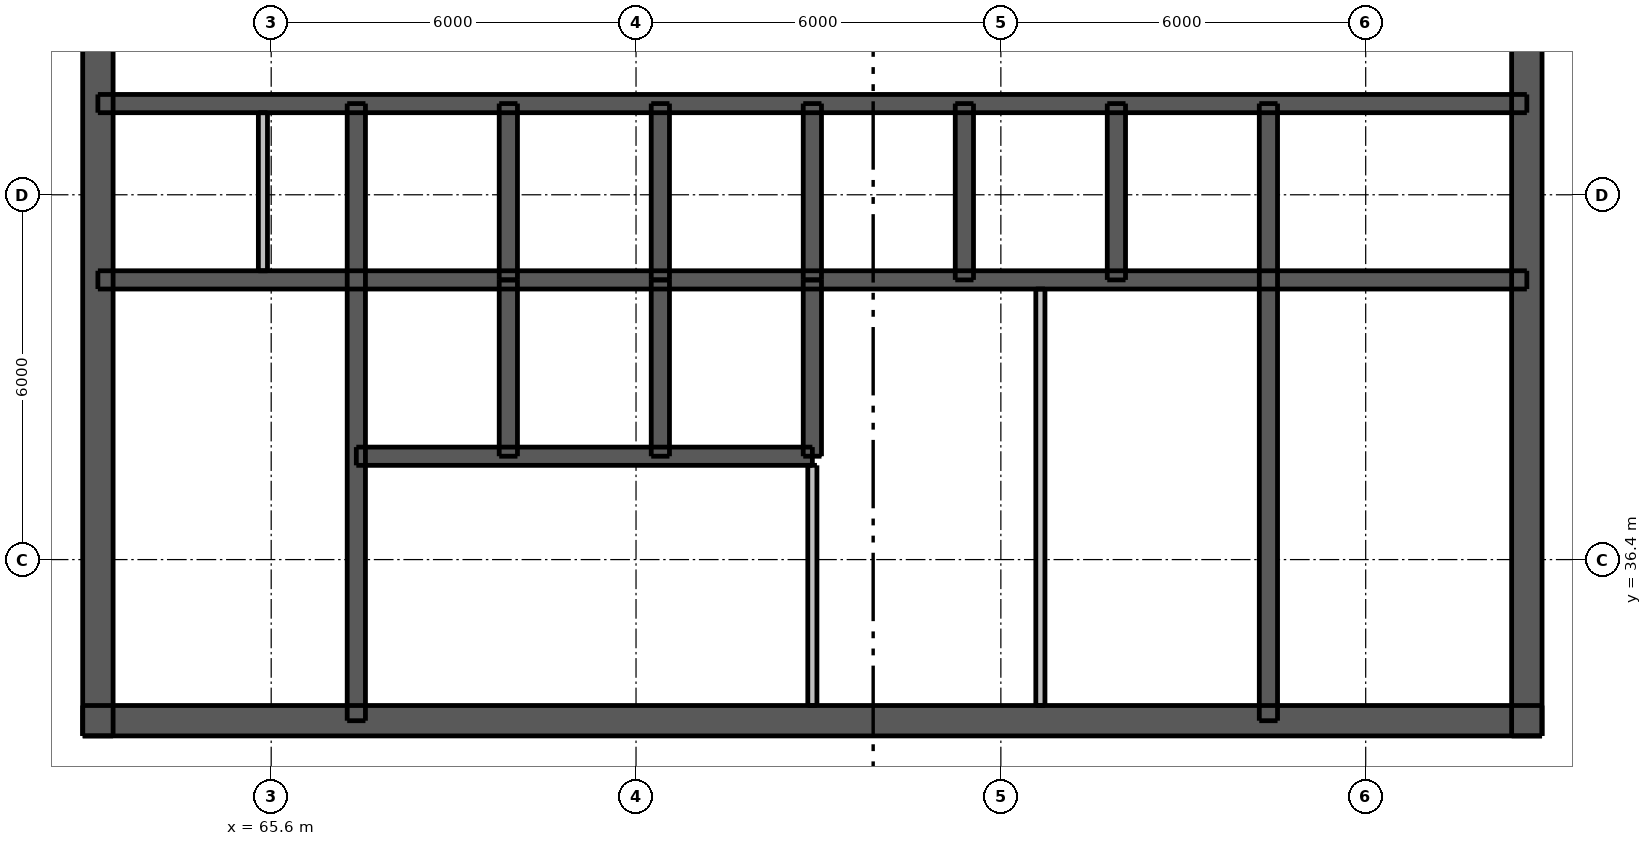
"""IFC4 building model, lengths in metres.
Left out: names, types, materials, properties, quantities, classifications, styles, units other than length and angle.
Written with IfcOpenShell. Run it as: python <this file> out.ifc"""

import sys

from ifc_helpers import new_model, si_unit, direction, frame, frame_2d, origin, place, context, subcontext, project, spatial, rectangle, extrude, element, fill, save


model = new_model("IFC4")
c1 = context("Model", 3, precision=1e-05, world=origin(), true_north=direction((0.0, 1.0)))
c2 = subcontext(c1, "Body", "Model", "MODEL_VIEW")
j1 = project(units=[si_unit("LENGTHUNIT", "METRE"), si_unit("PLANEANGLEUNIT", "RADIAN")], contexts=[c1])
p1 = place(None, origin())
s1 = spatial("IfcSite", under=j1, at=p1, CompositionType="ELEMENT")
p2 = place(p1, origin())
s2 = spatial("IfcBuilding", under=s1, at=p2, CompositionType="ELEMENT")
p3 = place(p2, frame((0.0, 0.0, 262.0)))
s3 = spatial("IfcBuildingStorey", under=s2, at=p3, CompositionType="ELEMENT", Elevation=262.0)
p4 = place(p3, frame((62.5, 33.75, 0.0), z_axis=(0.0, 0.0, 1.0), x_axis=(1.0, 0.0, 0.0)))
e1 = element("IfcWall", 1, at=p4, inside=s3, PredefinedType="SHEAR", context=c2, shape_type="SweptSolid", body=[
    extrude(rectangle(XDim=24.0, YDim=0.5, at=frame_2d((12.0, 0.0))), origin(), (0.0, 0.0, 1.0), 3.05),
])
p5 = place(p4, frame((1.875, 0.0, 0.0)))
e2 = element("IfcOpeningElement", 2, at=p5, cuts=e1, PredefinedType="OPENING", context=c2, shape_type="SweptSolid", body=[
    extrude(rectangle(XDim=1.1, YDim=2.1, at=frame_2d((0.55, 1.05))), frame((0.0, 0.26, 0.0), z_axis=(0.0, -1.0, 0.0), x_axis=(1.0, 0.0, 0.0)), (0.0, 0.0, 1.0), 0.52),
])
p6 = place(p4, frame((21.025, 0.0, 0.0)))
e3 = element("IfcOpeningElement", 3, at=p6, cuts=e1, PredefinedType="OPENING", context=c2, shape_type="SweptSolid", body=[
    extrude(rectangle(XDim=1.1, YDim=2.1, at=frame_2d((0.55, 1.05))), frame((0.0, 0.26, 0.0), z_axis=(0.0, -1.0, 0.0), x_axis=(1.0, 0.0, 0.0)), (0.0, 0.0, 1.0), 0.52),
])
p7 = place(p4, frame((8.0, 0.0, 0.0)))
e4 = element("IfcOpeningElement", 4, at=p7, cuts=e1, PredefinedType="OPENING", context=c2, shape_type="SweptSolid", body=[
    extrude(rectangle(XDim=1.1, YDim=2.1, at=frame_2d((0.55, 1.05))), frame((0.0, 0.26, 0.0), z_axis=(0.0, -1.0, 0.0), x_axis=(1.0, 0.0, 0.0)), (0.0, 0.0, 1.0), 0.52),
])
p8 = place(p4, frame((13.5, 0.0, 0.0)))
e5 = element("IfcOpeningElement", 5, at=p8, cuts=e1, PredefinedType="OPENING", context=c2, shape_type="SweptSolid", body=[
    extrude(rectangle(XDim=0.9, YDim=2.1, at=frame_2d((0.45, 1.05))), frame((0.0, 0.26, 0.0), z_axis=(0.0, -1.0, 0.0), x_axis=(1.0, 0.0, 0.0)), (0.0, 0.0, 1.0), 0.52),
])
p9 = place(p4, frame((17.1, 0.0, 0.0)))
e6 = element("IfcOpeningElement", 6, at=p9, cuts=e1, PredefinedType="OPENING", context=c2, shape_type="SweptSolid", body=[
    extrude(rectangle(XDim=0.9, YDim=2.1, at=frame_2d((0.45, 1.05))), frame((0.0, 0.26, 0.0), z_axis=(0.0, -1.0, 0.0), x_axis=(1.0, 0.0, 0.0)), (0.0, 0.0, 1.0), 0.52),
])
p10 = place(p3, frame((62.75, 33.5, 0.0), z_axis=(0.0, 0.0, 1.0), x_axis=(0.0, 1.0, 0.0)))
e7 = element("IfcWall", 7, at=p10, inside=s3, PredefinedType="SHEAR", context=c2, shape_type="SweptSolid", body=[
    extrude(rectangle(XDim=24.0, YDim=0.5, at=frame_2d((12.0, 0.0))), origin(), (0.0, 0.0, 1.0), 3.05),
])
p11 = place(p10, frame((11.2, 0.0, 0.0)))
e8 = element("IfcOpeningElement", 8, at=p11, cuts=e7, PredefinedType="OPENING", context=c2, shape_type="SweptSolid", body=[
    extrude(rectangle(XDim=1.6, YDim=2.1, at=frame_2d((0.8, 1.05))), frame((0.0, 0.26, 0.0), z_axis=(0.0, -1.0, 0.0), x_axis=(1.0, 0.0, 0.0)), (0.0, 0.0, 1.0), 0.52),
])
p12 = place(p3, frame((86.25, 33.5, 0.0), z_axis=(0.0, 0.0, 1.0), x_axis=(0.0, 1.0, 0.0)))
e9 = element("IfcWall", 9, at=p12, inside=s3, PredefinedType="SHEAR", context=c2, shape_type="SweptSolid", body=[
    extrude(rectangle(XDim=24.0, YDim=0.5, at=frame_2d((12.0, 0.0))), origin(), (0.0, 0.0, 1.0), 3.05),
])
p13 = place(p12, frame((11.2, 0.0, 0.0)))
e10 = element("IfcOpeningElement", 10, at=p13, cuts=e9, PredefinedType="OPENING", context=c2, shape_type="SweptSolid", body=[
    extrude(rectangle(XDim=1.6, YDim=2.1, at=frame_2d((0.8, 1.05))), frame((0.0, 0.26, 0.0), z_axis=(0.0, -1.0, 0.0), x_axis=(1.0, 0.0, 0.0)), (0.0, 0.0, 1.0), 0.52),
])
p14 = place(p3, frame((62.75, 41.0, 0.0), z_axis=(0.0, 0.0, 1.0), x_axis=(1.0, 0.0, 0.0)))
e11 = element("IfcWall", 11, at=p14, inside=s3, PredefinedType="SHEAR", context=c2, shape_type="SweptSolid", body=[
    extrude(rectangle(XDim=23.5, YDim=0.3, at=frame_2d((11.75, 0.0))), origin(), (0.0, 0.0, 1.0), 3.05),
])
p15 = place(p3, frame((62.75, 43.9, 0.0), z_axis=(0.0, 0.0, 1.0), x_axis=(1.0, 0.0, 0.0)))
e12 = element("IfcWall", 12, at=p15, inside=s3, PredefinedType="SHEAR", context=c2, shape_type="SweptSolid", body=[
    extrude(rectangle(XDim=23.5, YDim=0.3, at=frame_2d((11.75, 0.0))), origin(), (0.0, 0.0, 1.0), 3.05),
])
p16 = place(p15, frame((1.032, 0.0, 0.0)))
e13 = element("IfcOpeningElement", 13, at=p16, cuts=e12, PredefinedType="OPENING", context=c2, shape_type="SweptSolid", body=[
    extrude(rectangle(XDim=0.9, YDim=2.1, at=frame_2d((0.45, 1.05))), frame((0.0, 0.16, 0.0), z_axis=(0.0, -1.0, 0.0), x_axis=(1.0, 0.0, 0.0)), (0.0, 0.0, 1.0), 0.32),
])
p17 = place(p15, frame((3.007, 0.0, 0.0)))
e14 = element("IfcOpeningElement", 14, at=p17, cuts=e12, PredefinedType="OPENING", context=c2, shape_type="SweptSolid", body=[
    extrude(rectangle(XDim=0.8, YDim=2.1, at=frame_2d((0.4, 1.05))), frame((0.0, 0.16, 0.0), z_axis=(0.0, -1.0, 0.0), x_axis=(1.0, 0.0, 0.0)), (0.0, 0.0, 1.0), 0.32),
])
p18 = place(p15, frame((20.875, 0.0, 0.0)))
e15 = element("IfcOpeningElement", 15, at=p18, cuts=e12, PredefinedType="OPENING", context=c2, shape_type="SweptSolid", body=[
    extrude(rectangle(XDim=0.9, YDim=2.1, at=frame_2d((0.45, 1.05))), frame((0.0, 0.16, 0.0), z_axis=(0.0, -1.0, 0.0), x_axis=(1.0, 0.0, 0.0)), (0.0, 0.0, 1.0), 0.32),
])
p19 = place(p15, frame((5.05, 0.0, 0.0)))
e16 = element("IfcOpeningElement", 16, at=p19, cuts=e12, PredefinedType="OPENING", context=c2, shape_type="SweptSolid", body=[
    extrude(rectangle(XDim=0.9, YDim=2.1, at=frame_2d((0.45, 1.05))), frame((0.0, 0.16, 0.0), z_axis=(0.0, -1.0, 0.0), x_axis=(1.0, 0.0, 0.0)), (0.0, 0.0, 1.0), 0.32),
])
p20 = place(p15, frame((10.05, 0.0, 0.0)))
e17 = element("IfcOpeningElement", 17, at=p20, cuts=e12, PredefinedType="OPENING", context=c2, shape_type="SweptSolid", body=[
    extrude(rectangle(XDim=0.9, YDim=2.1, at=frame_2d((0.45, 1.05))), frame((0.0, 0.16, 0.0), z_axis=(0.0, -1.0, 0.0), x_axis=(1.0, 0.0, 0.0)), (0.0, 0.0, 1.0), 0.32),
])
p21 = place(p15, frame((12.55, 0.0, 0.0)))
e18 = element("IfcOpeningElement", 18, at=p21, cuts=e12, PredefinedType="OPENING", context=c2, shape_type="SweptSolid", body=[
    extrude(rectangle(XDim=0.9, YDim=2.1, at=frame_2d((0.45, 1.05))), frame((0.0, 0.16, 0.0), z_axis=(0.0, -1.0, 0.0), x_axis=(1.0, 0.0, 0.0)), (0.0, 0.0, 1.0), 0.32),
])
p22 = place(p15, frame((17.55, 0.0, 0.0)))
e19 = element("IfcOpeningElement", 19, at=p22, cuts=e12, PredefinedType="OPENING", context=c2, shape_type="SweptSolid", body=[
    extrude(rectangle(XDim=0.9, YDim=2.1, at=frame_2d((0.45, 1.05))), frame((0.0, 0.16, 0.0), z_axis=(0.0, -1.0, 0.0), x_axis=(1.0, 0.0, 0.0)), (0.0, 0.0, 1.0), 0.32),
])
p23 = place(p3, frame((67.0, 33.75, 0.0), z_axis=(0.0, 0.0, 1.0), x_axis=(0.0, 1.0, 0.0)))
e20 = element("IfcWall", 20, at=p23, inside=s3, PredefinedType="SHEAR", context=c2, shape_type="SweptSolid", body=[
    extrude(rectangle(XDim=10.15, YDim=0.3, at=frame_2d((5.075, 0.0))), origin(), (0.0, 0.0, 1.0), 3.05),
])
p24 = place(p23, frame((0.45, 0.0, 0.0)))
e21 = element("IfcOpeningElement", 21, at=p24, cuts=e20, PredefinedType="OPENING", context=c2, shape_type="SweptSolid", body=[
    extrude(rectangle(XDim=1.1, YDim=2.1, at=frame_2d((0.55, 1.05))), frame((0.0, 0.16, 0.0), z_axis=(0.0, -1.0, 0.0), x_axis=(1.0, 0.0, 0.0)), (0.0, 0.0, 1.0), 0.32),
])
p25 = place(p3, frame((82.0, 33.75, 0.0), z_axis=(0.0, 0.0, 1.0), x_axis=(0.0, 1.0, 0.0)))
e22 = element("IfcWall", 22, at=p25, inside=s3, PredefinedType="SHEAR", context=c2, shape_type="SweptSolid", body=[
    extrude(rectangle(XDim=10.15, YDim=0.3, at=frame_2d((5.075, 0.0))), origin(), (0.0, 0.0, 1.0), 3.05),
])
for number, where, z_axis, x_axis in (
    (23, (69.5, 41.0, 0.0), (0.0, 0.0, 1.0), (0.0, 1.0, 0.0)),
    (24, (72.0, 41.0, 0.0), (0.0, 0.0, 1.0), (0.0, 1.0, 0.0)),
    (25, (74.5, 41.0, 0.0), (0.0, 0.0, 1.0), (0.0, 1.0, 0.0)),
    (26, (77.0, 41.0, 0.0), (0.0, 0.0, 1.0), (0.0, 1.0, 0.0)),
    (27, (79.5, 41.0, 0.0), (0.0, 0.0, 1.0), (0.0, 1.0, 0.0)),
):
    element("IfcWall", number, at=place(p3, frame(where, z_axis=z_axis, x_axis=x_axis)), inside=s3, PredefinedType="SHEAR", context=c2, shape_type="SweptSolid", body=[
        extrude(rectangle(XDim=2.9, YDim=0.3, at=frame_2d((1.45, 0.0))), origin(), (0.0, 0.0, 1.0), 3.05),
    ])
p26 = place(p3, frame((67.0, 38.1, 0.0), z_axis=(0.0, 0.0, 1.0), x_axis=(1.0, 0.0, 0.0)))
e28 = element("IfcWall", 28, at=p26, inside=s3, PredefinedType="SHEAR", context=c2, shape_type="SweptSolid", body=[
    extrude(rectangle(XDim=7.5, YDim=0.3, at=frame_2d((3.75, 0.0))), origin(), (0.0, 0.0, 1.0), 3.05),
])
p27 = place(p26, frame((0.7, 0.0, 0.0)))
e29 = element("IfcOpeningElement", 29, at=p27, cuts=e28, PredefinedType="OPENING", context=c2, shape_type="SweptSolid", body=[
    extrude(rectangle(XDim=1.1, YDim=2.1, at=frame_2d((0.55, 1.05))), frame((0.0, 0.16, 0.0), z_axis=(0.0, -1.0, 0.0), x_axis=(1.0, 0.0, 0.0)), (0.0, 0.0, 1.0), 0.32),
])
p28 = place(p26, frame((3.2, 0.0, 0.0)))
e30 = element("IfcOpeningElement", 30, at=p28, cuts=e28, PredefinedType="OPENING", context=c2, shape_type="SweptSolid", body=[
    extrude(rectangle(XDim=1.1, YDim=2.1, at=frame_2d((0.55, 1.05))), frame((0.0, 0.16, 0.0), z_axis=(0.0, -1.0, 0.0), x_axis=(1.0, 0.0, 0.0)), (0.0, 0.0, 1.0), 0.32),
])
p29 = place(p26, frame((5.65, 0.0, 0.0)))
e31 = element("IfcOpeningElement", 31, at=p29, cuts=e28, PredefinedType="OPENING", context=c2, shape_type="SweptSolid", body=[
    extrude(rectangle(XDim=1.2, YDim=2.1, at=frame_2d((0.6, 1.05))), frame((0.0, 0.16, 0.0), z_axis=(0.0, -1.0, 0.0), x_axis=(1.0, 0.0, 0.0)), (0.0, 0.0, 1.0), 0.32),
])
for number, where, z_axis, x_axis in (
    (32, (69.5, 38.1, 0.0), (0.0, 0.0, 1.0), (0.0, 1.0, 0.0)),
    (33, (72.0, 38.1, 0.0), (0.0, 0.0, 1.0), (0.0, 1.0, 0.0)),
    (34, (74.5, 38.1, 0.0), (0.0, 0.0, 1.0), (0.0, 1.0, 0.0)),
):
    element("IfcWall", number, at=place(p3, frame(where, z_axis=z_axis, x_axis=x_axis)), inside=s3, PredefinedType="SHEAR", context=c2, shape_type="SweptSolid", body=[
        extrude(rectangle(XDim=2.9, YDim=0.3, at=frame_2d((1.45, 0.0))), origin(), (0.0, 0.0, 1.0), 3.05),
    ])
p30 = place(p3, frame((74.5, 34.0, 0.0), z_axis=(0.0, 0.0, 1.0), x_axis=(0.0, 1.0, 0.0)))
e35 = element("IfcWall", 35, at=p30, inside=s3, PredefinedType="PLUMBINGWALL", context=c2, shape_type="SweptSolid", body=[
    extrude(rectangle(XDim=3.95, YDim=0.15, at=frame_2d((1.975, 0.0))), origin(), (0.0, 0.0, 1.0), 3.05),
])
p31 = place(p3, frame((78.25, 34.0, 0.0), z_axis=(0.0, 0.0, 1.0), x_axis=(0.0, 1.0, 0.0)))
e36 = element("IfcWall", 36, at=p31, inside=s3, PredefinedType="PLUMBINGWALL", context=c2, shape_type="SweptSolid", body=[
    extrude(rectangle(XDim=6.85, YDim=0.15, at=frame_2d((3.425, 0.0))), origin(), (0.0, 0.0, 1.0), 3.05),
])
p32 = place(p3, frame((65.464, 41.15, 0.0), z_axis=(0.0, 0.0, 1.0), x_axis=(0.0, 1.0, 0.0)))
e37 = element("IfcWall", 37, at=p32, inside=s3, PredefinedType="PLUMBINGWALL", context=c2, shape_type="SweptSolid", body=[
    extrude(rectangle(XDim=2.6, YDim=0.15, at=frame_2d((1.3, 0.0))), origin(), (0.0, 0.0, 1.0), 3.05),
])
p33 = place(p5, origin())
e38 = element("IfcDoor", 38, at=p33, inside=s3, OperationType="SINGLE_SWING_LEFT", PredefinedType="DOOR", context=c2, shape_type="SweptSolid", body=[
    extrude(rectangle(XDim=1.1, YDim=2.1, at=frame_2d((0.55, 1.05))), frame((0.0, 0.237, 0.0), z_axis=(0.0, -1.0, 0.0), x_axis=(1.0, 0.0, 0.0)), (0.0, 0.0, 1.0), 0.05),
])
fill(e2, e38)
p34 = place(p6, origin())
e39 = element("IfcDoor", 39, at=p34, inside=s3, OperationType="SINGLE_SWING_RIGHT", PredefinedType="DOOR", context=c2, shape_type="SweptSolid", body=[
    extrude(rectangle(XDim=1.1, YDim=2.1, at=frame_2d((0.55, 1.05))), frame((0.0, 0.237, 0.0), z_axis=(0.0, -1.0, 0.0), x_axis=(1.0, 0.0, 0.0)), (0.0, 0.0, 1.0), 0.05),
])
fill(e3, e39)
p35 = place(p11, origin())
e40 = element("IfcDoor", 40, at=p35, inside=s3, OperationType="DOUBLE_DOOR_SINGLE_SWING", PredefinedType="DOOR", context=c2, shape_type="SweptSolid", body=[
    extrude(rectangle(XDim=1.6, YDim=2.1, at=frame_2d((0.8, 1.05))), frame((0.0, -0.188, 0.0), z_axis=(0.0, -1.0, 0.0), x_axis=(1.0, 0.0, 0.0)), (0.0, 0.0, 1.0), 0.05),
])
fill(e8, e40)
p36 = place(p13, origin())
e41 = element("IfcDoor", 41, at=p36, inside=s3, OperationType="DOUBLE_DOOR_SINGLE_SWING", PredefinedType="DOOR", context=c2, shape_type="SweptSolid", body=[
    extrude(rectangle(XDim=1.6, YDim=2.1, at=frame_2d((0.8, 1.05))), frame((0.0, 0.237, 0.0), z_axis=(0.0, -1.0, 0.0), x_axis=(1.0, 0.0, 0.0)), (0.0, 0.0, 1.0), 0.05),
])
fill(e10, e41)
p37 = place(p7, origin())
e42 = element("IfcDoor", 42, at=p37, inside=s3, OperationType="SINGLE_SWING_LEFT", PredefinedType="DOOR", context=c2, shape_type="SweptSolid", body=[
    extrude(rectangle(XDim=1.1, YDim=2.1, at=frame_2d((0.55, 1.05))), frame((0.0, 0.237, 0.0), z_axis=(0.0, -1.0, 0.0), x_axis=(1.0, 0.0, 0.0)), (0.0, 0.0, 1.0), 0.05),
])
fill(e4, e42)
p38 = place(p24, origin())
e43 = element("IfcDoor", 43, at=p38, inside=s3, OperationType="SINGLE_SWING_RIGHT", PredefinedType="DOOR", context=c2, shape_type="SweptSolid", body=[
    extrude(rectangle(XDim=1.1, YDim=2.1, at=frame_2d((0.55, 1.05))), frame((0.0, -0.087, 0.0), z_axis=(0.0, -1.0, 0.0), x_axis=(1.0, 0.0, 0.0)), (0.0, 0.0, 1.0), 0.05),
])
fill(e21, e43)
p39 = place(p8, origin())
e44 = element("IfcDoor", 44, at=p39, inside=s3, OperationType="SINGLE_SWING_LEFT", PredefinedType="DOOR", context=c2, shape_type="SweptSolid", body=[
    extrude(rectangle(XDim=0.9, YDim=2.1, at=frame_2d((0.45, 1.05))), frame((0.0, 0.237, 0.0), z_axis=(0.0, -1.0, 0.0), x_axis=(1.0, 0.0, 0.0)), (0.0, 0.0, 1.0), 0.05),
])
fill(e5, e44)
p40 = place(p9, origin())
e45 = element("IfcDoor", 45, at=p40, inside=s3, OperationType="SINGLE_SWING_LEFT", PredefinedType="DOOR", context=c2, shape_type="SweptSolid", body=[
    extrude(rectangle(XDim=0.9, YDim=2.1, at=frame_2d((0.45, 1.05))), frame((0.0, 0.237, 0.0), z_axis=(0.0, -1.0, 0.0), x_axis=(1.0, 0.0, 0.0)), (0.0, 0.0, 1.0), 0.05),
])
fill(e6, e45)
p41 = place(p16, origin())
e46 = element("IfcDoor", 46, at=p41, inside=s3, OperationType="SINGLE_SWING_LEFT", PredefinedType="DOOR", context=c2, shape_type="SweptSolid", body=[
    extrude(rectangle(XDim=0.9, YDim=2.1, at=frame_2d((0.45, 1.05))), frame((0.0, -0.087, 0.0), z_axis=(0.0, -1.0, 0.0), x_axis=(1.0, 0.0, 0.0)), (0.0, 0.0, 1.0), 0.05),
])
fill(e13, e46)
p42 = place(p17, origin())
e47 = element("IfcDoor", 47, at=p42, inside=s3, OperationType="SINGLE_SWING_RIGHT", PredefinedType="DOOR", context=c2, shape_type="SweptSolid", body=[
    extrude(rectangle(XDim=0.8, YDim=2.1, at=frame_2d((0.4, 1.05))), frame((0.0, -0.087, 0.0), z_axis=(0.0, -1.0, 0.0), x_axis=(1.0, 0.0, 0.0)), (0.0, 0.0, 1.0), 0.05),
])
fill(e14, e47)
p43 = place(p18, origin())
e48 = element("IfcDoor", 48, at=p43, inside=s3, OperationType="SINGLE_SWING_LEFT", PredefinedType="DOOR", context=c2, shape_type="SweptSolid", body=[
    extrude(rectangle(XDim=0.9, YDim=2.1, at=frame_2d((0.45, 1.05))), frame((0.0, -0.087, 0.0), z_axis=(0.0, -1.0, 0.0), x_axis=(1.0, 0.0, 0.0)), (0.0, 0.0, 1.0), 0.05),
])
fill(e15, e48)
p44 = place(p19, origin())
e49 = element("IfcDoor", 49, at=p44, inside=s3, OperationType="SINGLE_SWING_RIGHT", PredefinedType="DOOR", context=c2, shape_type="SweptSolid", body=[
    extrude(rectangle(XDim=0.9, YDim=2.1, at=frame_2d((0.45, 1.05))), frame((0.0, -0.087, 0.0), z_axis=(0.0, -1.0, 0.0), x_axis=(1.0, 0.0, 0.0)), (0.0, 0.0, 1.0), 0.05),
])
fill(e16, e49)
p45 = place(p20, origin())
e50 = element("IfcDoor", 50, at=p45, inside=s3, OperationType="SINGLE_SWING_RIGHT", PredefinedType="DOOR", context=c2, shape_type="SweptSolid", body=[
    extrude(rectangle(XDim=0.9, YDim=2.1, at=frame_2d((0.45, 1.05))), frame((0.0, -0.087, 0.0), z_axis=(0.0, -1.0, 0.0), x_axis=(1.0, 0.0, 0.0)), (0.0, 0.0, 1.0), 0.05),
])
fill(e17, e50)
p46 = place(p21, origin())
e51 = element("IfcDoor", 51, at=p46, inside=s3, OperationType="SINGLE_SWING_LEFT", PredefinedType="DOOR", context=c2, shape_type="SweptSolid", body=[
    extrude(rectangle(XDim=0.9, YDim=2.1, at=frame_2d((0.45, 1.05))), frame((0.0, -0.087, 0.0), z_axis=(0.0, -1.0, 0.0), x_axis=(1.0, 0.0, 0.0)), (0.0, 0.0, 1.0), 0.05),
])
fill(e18, e51)
p47 = place(p22, origin())
e52 = element("IfcDoor", 52, at=p47, inside=s3, OperationType="SINGLE_SWING_LEFT", PredefinedType="DOOR", context=c2, shape_type="SweptSolid", body=[
    extrude(rectangle(XDim=0.9, YDim=2.1, at=frame_2d((0.45, 1.05))), frame((0.0, -0.087, 0.0), z_axis=(0.0, -1.0, 0.0), x_axis=(1.0, 0.0, 0.0)), (0.0, 0.0, 1.0), 0.05),
])
fill(e19, e52)
p48 = place(p27, origin())
e53 = element("IfcDoor", 53, at=p48, inside=s3, OperationType="DOUBLE_DOOR_SLIDING", PredefinedType="DOOR", context=c2, shape_type="SweptSolid", body=[
    extrude(rectangle(XDim=1.1, YDim=2.1, at=frame_2d((0.55, 1.05))), frame((0.0, 0.025, 0.0), z_axis=(0.0, -1.0, 0.0), x_axis=(1.0, 0.0, 0.0)), (0.0, 0.0, 1.0), 0.05),
])
fill(e29, e53)
p49 = place(p28, origin())
e54 = element("IfcDoor", 54, at=p49, inside=s3, OperationType="DOUBLE_DOOR_SLIDING", PredefinedType="DOOR", context=c2, shape_type="SweptSolid", body=[
    extrude(rectangle(XDim=1.1, YDim=2.1, at=frame_2d((0.55, 1.05))), frame((0.0, 0.025, 0.0), z_axis=(0.0, -1.0, 0.0), x_axis=(1.0, 0.0, 0.0)), (0.0, 0.0, 1.0), 0.05),
])
fill(e30, e54)
p50 = place(p29, origin())
e55 = element("IfcDoor", 55, at=p50, inside=s3, OperationType="DOUBLE_DOOR_SLIDING", PredefinedType="DOOR", context=c2, shape_type="SweptSolid", body=[
    extrude(rectangle(XDim=1.2, YDim=2.1, at=frame_2d((0.6, 1.05))), frame((0.0, 0.025, 0.0), z_axis=(0.0, -1.0, 0.0), x_axis=(1.0, 0.0, 0.0)), (0.0, 0.0, 1.0), 0.05),
])
fill(e31, e55)
save(model, sys.argv[1])
